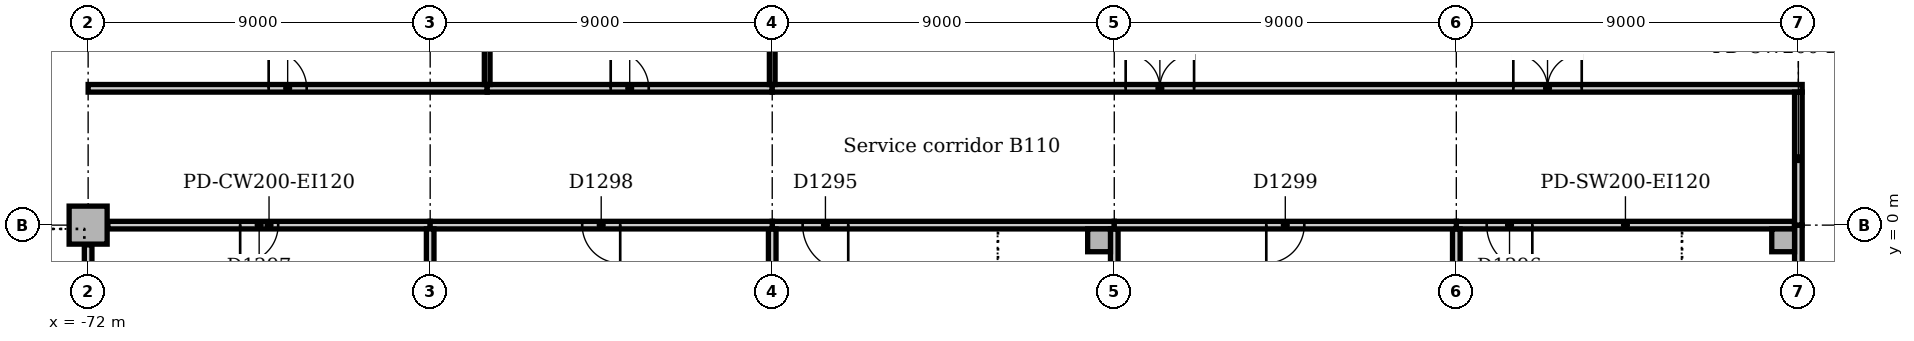
"""IFC4 building model, lengths in metres.
Left out: names, types, materials, properties, quantities, classifications, styles, units other than length and angle.
Written with IfcOpenShell. Run it as: python <this file> out.ifc"""

import sys

from ifc_helpers import new_model, si_unit, direction, frame, frame_2d, origin, origin_2d, place, context, subcontext, project, spatial, rectangle, extrude, element, fill, save


model = new_model("IFC4")
c1 = context("Model", 3, precision=1e-05, world=origin(), true_north=direction((0.0, 1.0)))
c2 = subcontext(c1, "Body", "Model", "MODEL_VIEW")
j1 = project(units=[si_unit("LENGTHUNIT", "METRE"), si_unit("PLANEANGLEUNIT", "RADIAN")], contexts=[c1])
p1 = place(None, origin())
s1 = spatial("IfcSite", under=j1, at=p1, CompositionType="ELEMENT")
p2 = place(p1, origin())
s2 = spatial("IfcBuilding", under=s1, at=p2, CompositionType="ELEMENT")
p3 = place(p2, frame((0.0, 0.0, -5.0)))
s3 = spatial("IfcBuildingStorey", under=s2, at=p3, CompositionType="ELEMENT", Elevation=-5.0)
p4 = place(p3, frame((-72.0, 0.0, 0.0), z_axis=(0.0, 0.0, 1.0), x_axis=(1.0, 0.0, 0.0)))
e1 = element("IfcColumn", 1, at=p4, inside=s3, PredefinedType="COLUMN", context=c2, shape_type="SweptSolid", body=[
    extrude(rectangle(XDim=1.0, YDim=1.0, at=origin_2d()), origin(), (0.0, 0.0, 1.0), 4.7),
])
for number, where, z_axis, x_axis in (
    (2, (-45.4, -0.4, 0.0), (0.0, 0.0, 1.0), (1.0, 0.0, 0.0)),
    (3, (-27.4, -0.4, 0.0), (0.0, 0.0, 1.0), (1.0, 0.0, 0.0)),
):
    element("IfcColumn", number, at=place(p3, frame(where, z_axis=z_axis, x_axis=x_axis)), inside=s3, PredefinedType="COLUMN", context=c2, shape_type="SweptSolid", body=[
        extrude(rectangle(XDim=0.6, YDim=0.6, at=origin_2d()), origin(), (0.0, 0.0, 1.0), 5.0),
    ])
p5 = place(p3, frame((-72.0, -4.65, 0.0), z_axis=(0.0, 0.0, 1.0), x_axis=(0.0, 1.0, 0.0)))
e4 = element("IfcWall", 4, at=p5, inside=s3, PredefinedType="SOLIDWALL", context=c2, shape_type="SweptSolid", body=[
    extrude(rectangle(XDim=4.13, YDim=0.2, at=frame_2d((2.065, 0.0))), origin(), (0.0, 0.0, 1.0), 4.7),
])
p6 = place(p3, frame((-54.0, 0.0, 0.0), z_axis=(0.0, 0.0, 1.0), x_axis=(1.0, 0.0, 0.0)))
e5 = element("IfcWall", 5, at=p6, inside=s3, PredefinedType="SOLIDWALL", context=c2, shape_type="SweptSolid", body=[
    extrude(rectangle(XDim=9.0, YDim=0.2, at=frame_2d((4.5, 0.0))), origin(), (0.0, 0.0, 1.0), 4.7),
])
p7 = place(p6, frame((0.8, 0.0, 0.0)))
e6 = element("IfcOpeningElement", 6, at=p7, cuts=e5, PredefinedType="OPENING", context=c2, shape_type="SweptSolid", body=[
    extrude(rectangle(XDim=1.2, YDim=2.1, at=frame_2d((0.6, 1.05))), frame((0.0, 0.11, 0.0), z_axis=(0.0, -1.0, 0.0), x_axis=(1.0, 0.0, 0.0)), (0.0, 0.0, 1.0), 0.22),
])
for number, where, z_axis, x_axis in (
    (7, (-54.0, -4.65, 0.0), (0.0, 0.0, 1.0), (0.0, 1.0, 0.0)),
    (8, (-45.0, -4.65, 0.0), (0.0, 0.0, 1.0), (0.0, 1.0, 0.0)),
):
    element("IfcWall", number, at=place(p3, frame(where, z_axis=z_axis, x_axis=x_axis)), inside=s3, PredefinedType="SOLIDWALL", context=c2, shape_type="SweptSolid", body=[
        extrude(rectangle(XDim=4.55, YDim=0.2, at=frame_2d((2.275, 0.0))), origin(), (0.0, 0.0, 1.0), 4.7),
    ])
p8 = place(p3, frame((-36.0, 0.0, 0.0), z_axis=(0.0, 0.0, 1.0), x_axis=(1.0, 0.0, 0.0)))
e9 = element("IfcWall", 9, at=p8, inside=s3, PredefinedType="SOLIDWALL", context=c2, shape_type="SweptSolid", body=[
    extrude(rectangle(XDim=8.9, YDim=0.2, at=frame_2d((4.45, 0.0))), origin(), (0.0, 0.0, 1.0), 4.7),
])
p9 = place(p8, frame((0.8, 0.0, 0.0)))
e10 = element("IfcOpeningElement", 10, at=p9, cuts=e9, PredefinedType="OPENING", context=c2, shape_type="SweptSolid", body=[
    extrude(rectangle(XDim=1.2, YDim=2.1, at=frame_2d((0.6, 1.05))), frame((0.0, 0.11, 0.0), z_axis=(0.0, -1.0, 0.0), x_axis=(1.0, 0.0, 0.0)), (0.0, 0.0, 1.0), 0.22),
])
for number, where, z_axis, x_axis in (
    (11, (-36.0, -4.65, 0.0), (0.0, 0.0, 1.0), (0.0, 1.0, 0.0)),
    (12, (-27.0, -4.55, 0.0), (0.0, 0.0, 1.0), (0.0, 1.0, 0.0)),
):
    element("IfcWall", number, at=place(p3, frame(where, z_axis=z_axis, x_axis=x_axis)), inside=s3, PredefinedType="SOLIDWALL", context=c2, shape_type="SweptSolid", body=[
        extrude(rectangle(XDim=4.55, YDim=0.2, at=frame_2d((2.275, 0.0))), origin(), (0.0, 0.0, 1.0), 4.7),
    ])
p10 = place(p3, frame((-71.48, 0.0, 0.0), z_axis=(0.0, 0.0, 1.0), x_axis=(1.0, 0.0, 0.0)))
e13 = element("IfcWall", 13, at=p10, inside=s3, PredefinedType="PARTITIONING", context=c2, shape_type="SweptSolid", body=[
    extrude(rectangle(XDim=8.48, YDim=0.2, at=frame_2d((4.24, 0.0))), origin(), (0.0, 0.0, 1.0), 4.7),
])
p11 = place(p10, frame((3.48, 0.0, 0.0)))
e14 = element("IfcOpeningElement", 14, at=p11, cuts=e13, PredefinedType="OPENING", context=c2, shape_type="SweptSolid", body=[
    extrude(rectangle(XDim=1.0, YDim=2.1, at=frame_2d((0.5, 1.05))), frame((0.0, 0.11, 0.0), z_axis=(0.0, -1.0, 0.0), x_axis=(1.0, 0.0, 0.0)), (0.0, 0.0, 1.0), 0.22),
])
p12 = place(p3, frame((-63.0, 0.0, 0.0), z_axis=(0.0, 0.0, 1.0), x_axis=(1.0, 0.0, 0.0)))
e15 = element("IfcWall", 15, at=p12, inside=s3, PredefinedType="PARTITIONING", context=c2, shape_type="SweptSolid", body=[
    extrude(rectangle(XDim=9.0, YDim=0.2, at=frame_2d((4.5, 0.0))), origin(), (0.0, 0.0, 1.0), 4.7),
])
p13 = place(p12, frame((4.0, 0.0, 0.0)))
e16 = element("IfcOpeningElement", 16, at=p13, cuts=e15, PredefinedType="OPENING", context=c2, shape_type="SweptSolid", body=[
    extrude(rectangle(XDim=1.0, YDim=2.1, at=frame_2d((0.5, 1.05))), frame((0.0, 0.11, 0.0), z_axis=(0.0, -1.0, 0.0), x_axis=(1.0, 0.0, 0.0)), (0.0, 0.0, 1.0), 0.22),
])
p14 = place(p3, frame((-45.0, 0.0, 0.0), z_axis=(0.0, 0.0, 1.0), x_axis=(1.0, 0.0, 0.0)))
e17 = element("IfcWall", 17, at=p14, inside=s3, PredefinedType="PARTITIONING", context=c2, shape_type="SweptSolid", body=[
    extrude(rectangle(XDim=9.0, YDim=0.2, at=frame_2d((4.5, 0.0))), origin(), (0.0, 0.0, 1.0), 4.7),
])
p15 = place(p14, frame((4.0, 0.0, 0.0)))
e18 = element("IfcOpeningElement", 18, at=p15, cuts=e17, PredefinedType="OPENING", context=c2, shape_type="SweptSolid", body=[
    extrude(rectangle(XDim=1.0, YDim=2.1, at=frame_2d((0.5, 1.05))), frame((0.0, 0.11, 0.0), z_axis=(0.0, -1.0, 0.0), x_axis=(1.0, 0.0, 0.0)), (0.0, 0.0, 1.0), 0.22),
])
p16 = place(p3, frame((-72.0, 3.6, 0.0), z_axis=(0.0, 0.0, 1.0), x_axis=(1.0, 0.0, 0.0)))
e19 = element("IfcWall", 19, at=p16, inside=s3, PredefinedType="PARTITIONING", context=c2, shape_type="SweptSolid", body=[
    extrude(rectangle(XDim=10.5, YDim=0.2, at=frame_2d((5.25, 0.0))), origin(), (0.0, 0.0, 1.0), 4.7),
])
p17 = place(p16, frame((4.75, 0.0, 0.0)))
e20 = element("IfcOpeningElement", 20, at=p17, cuts=e19, PredefinedType="OPENING", context=c2, shape_type="SweptSolid", body=[
    extrude(rectangle(XDim=1.0, YDim=2.1, at=frame_2d((0.5, 1.05))), frame((0.0, 0.11, 0.0), z_axis=(0.0, -1.0, 0.0), x_axis=(1.0, 0.0, 0.0)), (0.0, 0.0, 1.0), 0.22),
])
p18 = place(p3, frame((-61.5, 3.6, 0.0), z_axis=(0.0, 0.0, 1.0), x_axis=(1.0, 0.0, 0.0)))
e21 = element("IfcWall", 21, at=p18, inside=s3, PredefinedType="PARTITIONING", context=c2, shape_type="SweptSolid", body=[
    extrude(rectangle(XDim=7.5, YDim=0.2, at=frame_2d((3.75, 0.0))), origin(), (0.0, 0.0, 1.0), 4.7),
])
p19 = place(p18, frame((3.25, 0.0, 0.0)))
e22 = element("IfcOpeningElement", 22, at=p19, cuts=e21, PredefinedType="OPENING", context=c2, shape_type="SweptSolid", body=[
    extrude(rectangle(XDim=1.0, YDim=2.1, at=frame_2d((0.5, 1.05))), frame((0.0, 0.11, 0.0), z_axis=(0.0, -1.0, 0.0), x_axis=(1.0, 0.0, 0.0)), (0.0, 0.0, 1.0), 0.22),
])
p20 = place(p3, frame((-54.0, 3.6, 0.0), z_axis=(0.0, 0.0, 1.0), x_axis=(1.0, 0.0, 0.0)))
e23 = element("IfcWall", 23, at=p20, inside=s3, PredefinedType="PARTITIONING", context=c2, shape_type="SweptSolid", body=[
    extrude(rectangle(XDim=27.1, YDim=0.2, at=frame_2d((13.55, 0.0))), origin(), (0.0, 0.0, 1.0), 4.7),
])
p21 = place(p20, frame((9.3, 0.0, 0.0)))
e24 = element("IfcOpeningElement", 24, at=p21, cuts=e23, PredefinedType="OPENING", context=c2, shape_type="SweptSolid", body=[
    extrude(rectangle(XDim=1.8, YDim=2.1, at=frame_2d((0.9, 1.05))), frame((0.0, 0.11, 0.0), z_axis=(0.0, -1.0, 0.0), x_axis=(1.0, 0.0, 0.0)), (0.0, 0.0, 1.0), 0.22),
])
p22 = place(p20, frame((19.5, 0.0, 0.0)))
e25 = element("IfcOpeningElement", 25, at=p22, cuts=e23, PredefinedType="OPENING", context=c2, shape_type="SweptSolid", body=[
    extrude(rectangle(XDim=1.8, YDim=2.1, at=frame_2d((0.9, 1.05))), frame((0.0, 0.11, 0.0), z_axis=(0.0, -1.0, 0.0), x_axis=(1.0, 0.0, 0.0)), (0.0, 0.0, 1.0), 0.22),
])
p23 = place(p3, frame((-27.0, 0.0, 0.0), z_axis=(0.0, 0.0, 1.0), x_axis=(0.0, 1.0, 0.0)))
e26 = element("IfcWall", 26, at=p23, inside=s3, PredefinedType="PARTITIONING", context=c2, shape_type="SweptSolid", body=[
    extrude(rectangle(XDim=3.5, YDim=0.2, at=frame_2d((1.75, 0.0))), origin(), (0.0, 0.0, 1.0), 4.7),
])
p24 = place(p3, frame((-63.0, -8.48, 0.0), z_axis=(0.0, 0.0, 1.0), x_axis=(0.0, 1.0, 0.0)))
e27 = element("IfcWall", 27, at=p24, inside=s3, PredefinedType="PARTITIONING", context=c2, shape_type="SweptSolid", body=[
    extrude(rectangle(XDim=8.38, YDim=0.2, at=frame_2d((4.19, 0.0))), origin(), (0.0, 0.0, 1.0), 4.7),
])
p25 = place(p3, frame((-61.5, 3.7, 0.0), z_axis=(0.0, 0.0, 1.0), x_axis=(0.0, 1.0, 0.0)))
e28 = element("IfcWall", 28, at=p25, inside=s3, PredefinedType="PARTITIONING", context=c2, shape_type="SweptSolid", body=[
    extrude(rectangle(XDim=17.225, YDim=0.15, at=frame_2d((8.613, 0.0))), origin(), (0.0, 0.0, 1.0), 4.7),
])
p26 = place(p3, frame((-54.0, 3.7, 0.0), z_axis=(0.0, 0.0, 1.0), x_axis=(0.0, 1.0, 0.0)))
e29 = element("IfcWall", 29, at=p26, inside=s3, PredefinedType="PARTITIONING", context=c2, shape_type="SweptSolid", body=[
    extrude(rectangle(XDim=1.23, YDim=0.15, at=frame_2d((0.615, 0.0))), origin(), (0.0, 0.0, 1.0), 4.7),
])
p27 = place(p21, origin())
e30 = element("IfcDoor", 30, at=p27, inside=s3, OperationType="DOUBLE_DOOR_SINGLE_SWING", PredefinedType="DOOR", context=c2, shape_type="SweptSolid", body=[
    extrude(rectangle(XDim=1.8, YDim=2.1, at=frame_2d((0.9, 1.05))), frame((0.0, 0.025, 0.0), z_axis=(0.0, -1.0, 0.0), x_axis=(1.0, 0.0, 0.0)), (0.0, 0.0, 1.0), 0.05),
])
fill(e24, e30)
p28 = place(p22, origin())
e31 = element("IfcDoor", 31, at=p28, inside=s3, OperationType="DOUBLE_DOOR_SINGLE_SWING", PredefinedType="DOOR", context=c2, shape_type="SweptSolid", body=[
    extrude(rectangle(XDim=1.8, YDim=2.1, at=frame_2d((0.9, 1.05))), frame((0.0, 0.025, 0.0), z_axis=(0.0, -1.0, 0.0), x_axis=(1.0, 0.0, 0.0)), (0.0, 0.0, 1.0), 0.05),
])
fill(e25, e31)
p29 = place(p7, frame((1.2, 0.0, 0.0), z_axis=(0.0, 0.0, 1.0), x_axis=(-1.0, 0.0, 0.0)))
e32 = element("IfcDoor", 32, at=p29, inside=s3, OperationType="SINGLE_SWING_LEFT", PredefinedType="DOOR", context=c2, shape_type="SweptSolid", body=[
    extrude(rectangle(XDim=1.2, YDim=2.1, at=frame_2d((0.6, 1.05))), frame((0.0, 0.025, 0.0), z_axis=(0.0, -1.0, 0.0), x_axis=(1.0, 0.0, 0.0)), (0.0, 0.0, 1.0), 0.05),
])
fill(e6, e32)
p30 = place(p9, frame((1.2, 0.0, 0.0), z_axis=(0.0, 0.0, 1.0), x_axis=(-1.0, 0.0, 0.0)))
e33 = element("IfcDoor", 33, at=p30, inside=s3, OperationType="SINGLE_SWING_LEFT", PredefinedType="DOOR", context=c2, shape_type="SweptSolid", body=[
    extrude(rectangle(XDim=1.2, YDim=2.1, at=frame_2d((0.6, 1.05))), frame((0.0, 0.025, 0.0), z_axis=(0.0, -1.0, 0.0), x_axis=(1.0, 0.0, 0.0)), (0.0, 0.0, 1.0), 0.05),
])
fill(e10, e33)
p31 = place(p11, frame((1.0, 0.0, 0.0), z_axis=(0.0, 0.0, 1.0), x_axis=(-1.0, 0.0, 0.0)))
e34 = element("IfcDoor", 34, at=p31, inside=s3, OperationType="SINGLE_SWING_RIGHT", PredefinedType="DOOR", context=c2, shape_type="SweptSolid", body=[
    extrude(rectangle(XDim=1.0, YDim=2.1, at=frame_2d((0.5, 1.05))), frame((0.0, 0.025, 0.0), z_axis=(0.0, -1.0, 0.0), x_axis=(1.0, 0.0, 0.0)), (0.0, 0.0, 1.0), 0.05),
])
fill(e14, e34)
p32 = place(p13, frame((1.0, 0.0, 0.0), z_axis=(0.0, 0.0, 1.0), x_axis=(-1.0, 0.0, 0.0)))
e35 = element("IfcDoor", 35, at=p32, inside=s3, OperationType="SINGLE_SWING_LEFT", PredefinedType="DOOR", context=c2, shape_type="SweptSolid", body=[
    extrude(rectangle(XDim=1.0, YDim=2.1, at=frame_2d((0.5, 1.05))), frame((0.0, 0.025, 0.0), z_axis=(0.0, -1.0, 0.0), x_axis=(1.0, 0.0, 0.0)), (0.0, 0.0, 1.0), 0.05),
])
fill(e16, e35)
p33 = place(p15, frame((1.0, 0.0, 0.0), z_axis=(0.0, 0.0, 1.0), x_axis=(-1.0, 0.0, 0.0)))
e36 = element("IfcDoor", 36, at=p33, inside=s3, OperationType="SINGLE_SWING_RIGHT", PredefinedType="DOOR", context=c2, shape_type="SweptSolid", body=[
    extrude(rectangle(XDim=1.0, YDim=2.1, at=frame_2d((0.5, 1.05))), frame((0.0, 0.025, 0.0), z_axis=(0.0, -1.0, 0.0), x_axis=(1.0, 0.0, 0.0)), (0.0, 0.0, 1.0), 0.05),
])
fill(e18, e36)
p34 = place(p17, origin())
e37 = element("IfcDoor", 37, at=p34, inside=s3, OperationType="SINGLE_SWING_LEFT", PredefinedType="DOOR", context=c2, shape_type="SweptSolid", body=[
    extrude(rectangle(XDim=1.0, YDim=2.1, at=frame_2d((0.5, 1.05))), frame((0.0, 0.025, 0.0), z_axis=(0.0, -1.0, 0.0), x_axis=(1.0, 0.0, 0.0)), (0.0, 0.0, 1.0), 0.05),
])
fill(e20, e37)
p35 = place(p19, origin())
e38 = element("IfcDoor", 38, at=p35, inside=s3, OperationType="SINGLE_SWING_LEFT", PredefinedType="DOOR", context=c2, shape_type="SweptSolid", body=[
    extrude(rectangle(XDim=1.0, YDim=2.1, at=frame_2d((0.5, 1.05))), frame((0.0, 0.025, 0.0), z_axis=(0.0, -1.0, 0.0), x_axis=(1.0, 0.0, 0.0)), (0.0, 0.0, 1.0), 0.05),
])
fill(e22, e38)
save(model, sys.argv[1])
